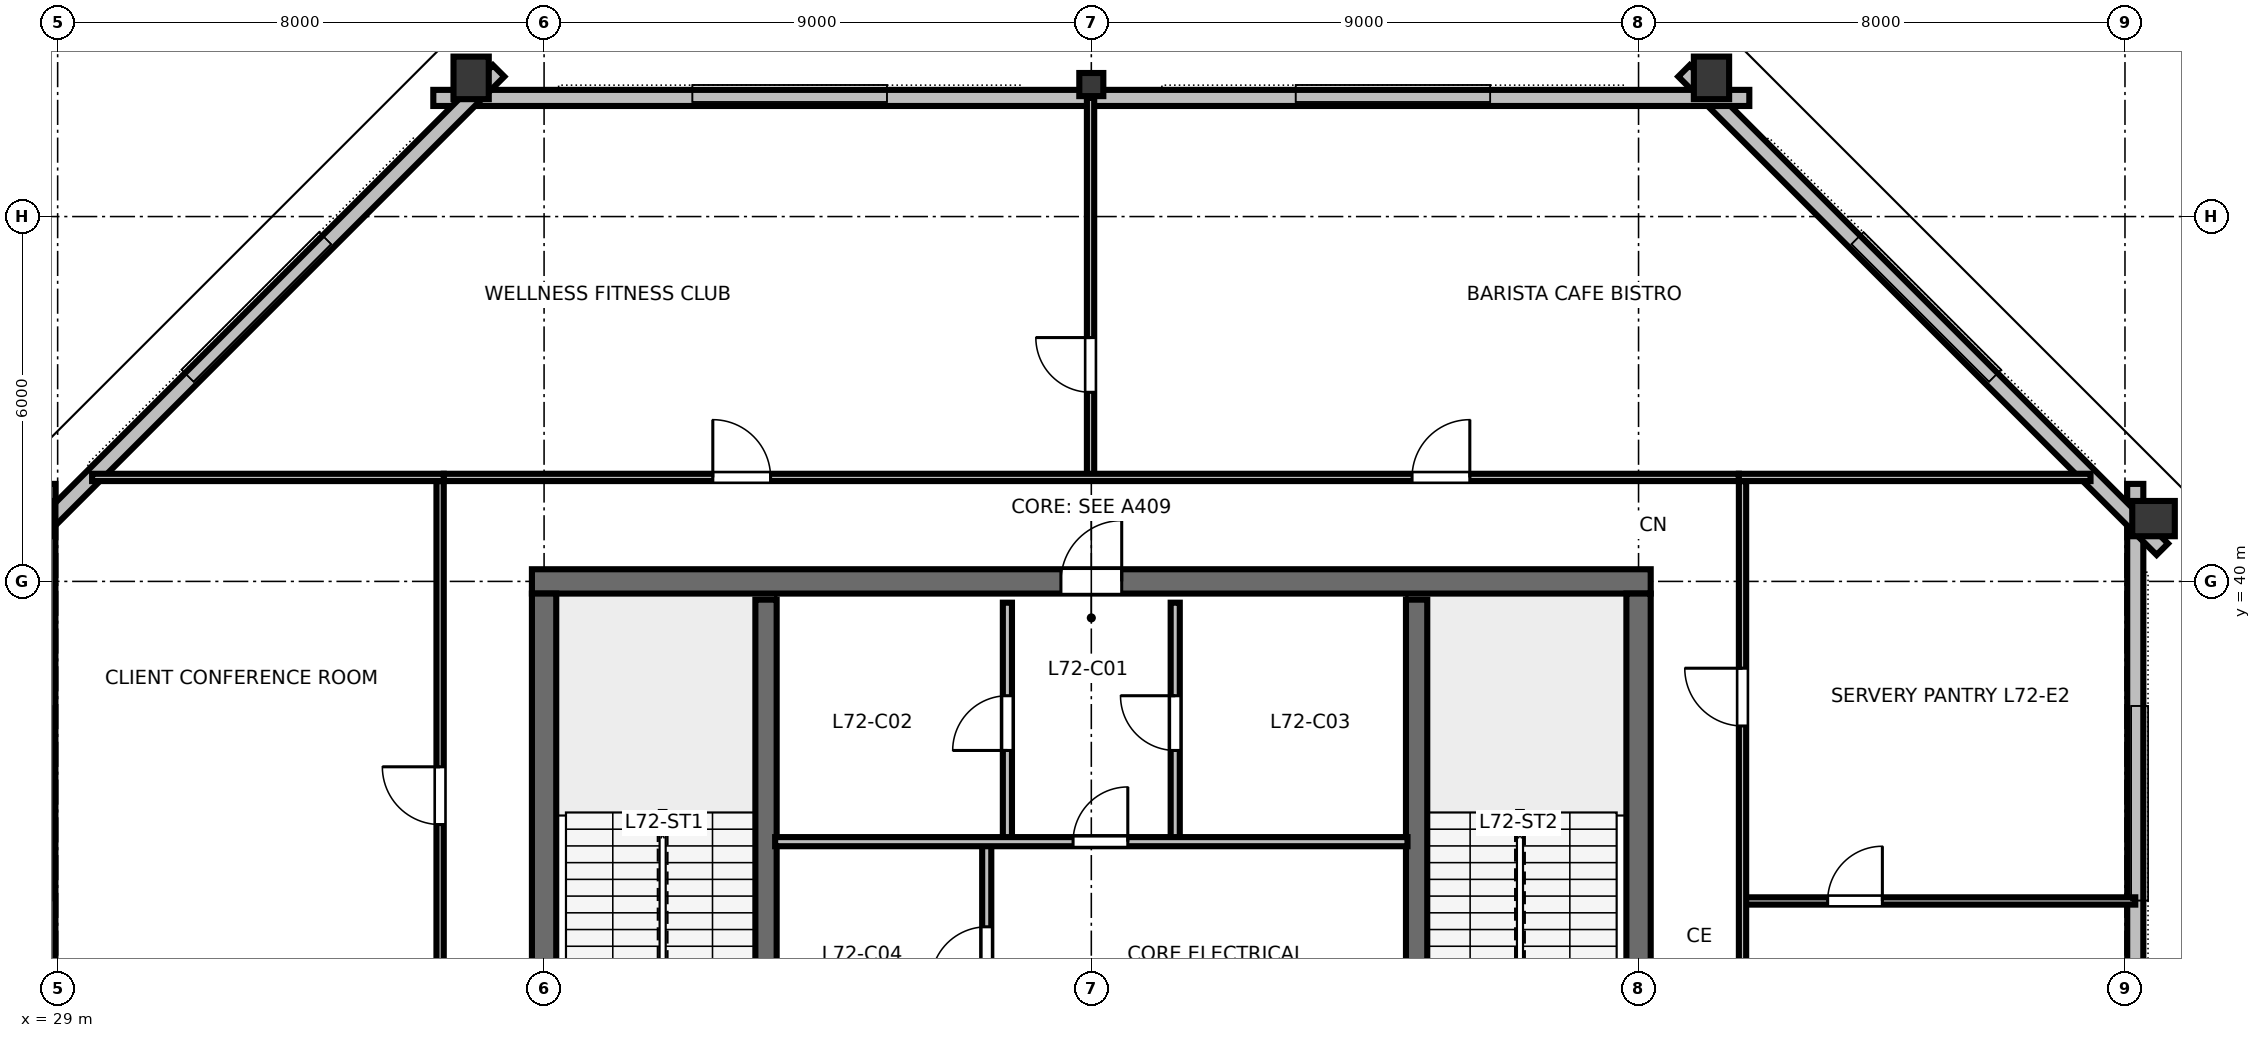
"""IFC4 building model, lengths in metres.
Left out: names, types, materials, properties, quantities, classifications, styles, units other than length and angle.
Written with IfcOpenShell. Run it as: python <this file> out.ifc"""

import sys

from ifc_helpers import new_model, si_unit, direction, frame, frame_2d, origin, origin_2d, place, context, subcontext, project, spatial, rectangle, hollow_rectangle, i_section, extrude, element, fill, save


model = new_model("IFC4")
c1 = context("Model", 3, precision=1e-05, world=origin(), true_north=direction((0.0, 1.0)))
c2 = subcontext(c1, "Body", "Model", "MODEL_VIEW")
j1 = project(units=[si_unit("LENGTHUNIT", "METRE"), si_unit("PLANEANGLEUNIT", "RADIAN")], contexts=[c1])
p1 = place(None, origin())
s1 = spatial("IfcSite", under=j1, at=p1, CompositionType="ELEMENT")
p2 = place(p1, origin())
s2 = spatial("IfcBuilding", under=s1, at=p2, CompositionType="ELEMENT")
p3 = place(p2, frame((0.0, 0.0, 271.8)))
s3 = spatial("IfcBuildingStorey", under=s2, at=p3, CompositionType="ELEMENT", Elevation=271.8)
p4 = place(p3, frame((36.8, 40.0, 0.0), z_axis=(0.0, 0.0, 1.0), x_axis=(1.0, 0.0, 0.0)))
e1 = element("IfcWall", 1, at=p4, inside=s3, PredefinedType="SHEAR", context=c2, shape_type="SweptSolid", body=[
    extrude(rectangle(XDim=18.4, YDim=0.4, at=frame_2d((9.2, 0.0))), origin(), (0.0, 0.0, 1.0), 3.36),
])
p5 = place(p4, frame((8.7, 0.0, 0.0)))
e2 = element("IfcOpeningElement", 2, at=p5, cuts=e1, PredefinedType="OPENING", context=c2, shape_type="SweptSolid", body=[
    extrude(rectangle(XDim=1.0, YDim=2.15, at=frame_2d((0.5, 1.075))), frame((0.0, 0.21, 0.0), z_axis=(0.0, -1.0, 0.0), x_axis=(1.0, 0.0, 0.0)), (0.0, 0.0, 1.0), 0.42),
])
p6 = place(p3, frame((37.0, 24.2, 0.0), z_axis=(0.0, 0.0, 1.0), x_axis=(0.0, 1.0, 0.0)))
e3 = element("IfcWall", 3, at=p6, inside=s3, PredefinedType="SHEAR", context=c2, shape_type="SweptSolid", body=[
    extrude(rectangle(XDim=15.6, YDim=0.4, at=frame_2d((7.8, 0.0))), origin(), (0.0, 0.0, 1.0), 3.36),
])
p7 = place(p6, frame((5.325, 0.0, 0.0)))
e4 = element("IfcOpeningElement", 4, at=p7, cuts=e3, PredefinedType="OPENING", context=c2, shape_type="SweptSolid", body=[
    extrude(rectangle(XDim=1.15, YDim=2.15, at=frame_2d((0.575, 1.075))), frame((0.0, 0.21, 0.0), z_axis=(0.0, -1.0, 0.0), x_axis=(1.0, 0.0, 0.0)), (0.0, 0.0, 1.0), 0.42),
])
p8 = place(p3, frame((55.0, 24.2, 0.0), z_axis=(0.0, 0.0, 1.0), x_axis=(0.0, 1.0, 0.0)))
e5 = element("IfcWall", 5, at=p8, inside=s3, PredefinedType="SHEAR", context=c2, shape_type="SweptSolid", body=[
    extrude(rectangle(XDim=15.6, YDim=0.4, at=frame_2d((7.8, 0.0))), origin(), (0.0, 0.0, 1.0), 3.36),
])
p9 = place(p8, frame((5.325, 0.0, 0.0)))
e6 = element("IfcOpeningElement", 6, at=p9, cuts=e5, PredefinedType="OPENING", context=c2, shape_type="SweptSolid", body=[
    extrude(rectangle(XDim=1.15, YDim=2.15, at=frame_2d((0.575, 1.075))), frame((0.0, 0.21, 0.0), z_axis=(0.0, -1.0, 0.0), x_axis=(1.0, 0.0, 0.0)), (0.0, 0.0, 1.0), 0.42),
])
for number, where, z_axis, x_axis in (
    (7, (63.469, 41.033, 0.0), (0.0, 0.0, 1.0), (0.0, 1.0, 0.0)),
    (8, (56.2, 48.281, 0.0), (0.0, 0.0, 1.0), (1.0, 0.0, 0.0)),
):
    element("IfcColumn", number, at=place(p3, frame(where, z_axis=z_axis, x_axis=x_axis)), inside=s3, PredefinedType="COLUMN", context=c2, shape_type="SweptSolid", body=[
        extrude(hollow_rectangle(XDim=0.58, YDim=0.7, WallThickness=0.032, at=origin_2d()), origin(), (0.0, 0.0, 1.0), 3.373),
    ])
p10 = place(p3, frame((46.0, 48.171, 0.0), z_axis=(0.0, 0.0, 1.0), x_axis=(1.0, 0.0, 0.0)))
e9 = element("IfcColumn", 9, at=p10, inside=s3, PredefinedType="COLUMN", context=c2, shape_type="SweptSolid", body=[
    extrude(i_section(OverallWidth=0.395, OverallDepth=0.38, WebThickness=0.019, FlangeThickness=0.03, FilletRadius=0.025, at=origin_2d()), origin(), (0.0, 0.0, 1.0), 3.373),
])
p11 = place(p3, frame((35.8, 48.281, 0.0), z_axis=(0.0, 0.0, 1.0), x_axis=(1.0, 0.0, 0.0)))
e10 = element("IfcColumn", 10, at=p11, inside=s3, PredefinedType="COLUMN", context=c2, shape_type="SweptSolid", body=[
    extrude(hollow_rectangle(XDim=0.58, YDim=0.7, WallThickness=0.032, at=origin_2d()), origin(), (0.0, 0.0, 1.0), 3.373),
])
p12 = place(p3, frame((63.169, 22.396, 0.0), z_axis=(0.0, 0.0, 1.0), x_axis=(0.0, 1.0, 0.0)))
e11 = element("IfcWall", 11, at=p12, inside=s3, PredefinedType="STANDARD", context=c2, shape_type="SweptSolid", body=[
    extrude(rectangle(XDim=19.207, YDim=0.265, at=frame_2d((9.604, 0.0))), origin(), (0.0, 0.0, 1.0), 2.832),
])
p13 = place(p3, frame((63.614, 40.529, 0.0), z_axis=(0.0, 0.0, 1.0), x_axis=(-0.707106781187, 0.707106781187, 0.0)))
e12 = element("IfcWall", 12, at=p13, inside=s3, PredefinedType="STANDARD", context=c2, shape_type="SweptSolid", body=[
    extrude(rectangle(XDim=11.125, YDim=0.265, at=frame_2d((5.562, 0.0))), origin(), (0.0, 0.0, 1.0), 2.832),
])
p14 = place(p3, frame((56.822, 47.951, 0.0), z_axis=(0.0, 0.0, 1.0), x_axis=(-1.0, 0.0, 0.0)))
e13 = element("IfcWall", 13, at=p14, inside=s3, PredefinedType="STANDARD", context=c2, shape_type="SweptSolid", body=[
    extrude(rectangle(XDim=21.644, YDim=0.265, at=frame_2d((10.822, 0.0))), origin(), (0.0, 0.0, 1.0), 2.832),
])
p15 = place(p3, frame((36.253, 48.396, 0.0), z_axis=(0.0, 0.0, 1.0), x_axis=(-0.707106781187, -0.707106781187, 0.0)))
e14 = element("IfcWall", 14, at=p15, inside=s3, PredefinedType="STANDARD", context=c2, shape_type="SweptSolid", body=[
    extrude(rectangle(XDim=11.125, YDim=0.265, at=frame_2d((5.562, 0.0))), origin(), (0.0, 0.0, 1.0), 2.832),
])
p16 = place(p3, frame((28.831, 41.604, 0.0), z_axis=(0.0, 0.0, 1.0), x_axis=(0.0, -1.0, 0.0)))
e15 = element("IfcWall", 15, at=p16, inside=s3, PredefinedType="STANDARD", context=c2, shape_type="SweptSolid", body=[
    extrude(rectangle(XDim=19.207, YDim=0.265, at=frame_2d((9.604, 0.0))), origin(), (0.0, 0.0, 1.0), 2.832),
])
for number, where, z_axis, x_axis in (
    (16, (40.65, 32.0, 0.0), (0.0, 0.0, 1.0), (0.0, 1.0, 0.0)),
    (17, (51.35, 32.0, 0.0), (0.0, 0.0, 1.0), (0.0, 1.0, 0.0)),
):
    element("IfcWall", number, at=place(p3, frame(where, z_axis=z_axis, x_axis=x_axis)), inside=s3, PredefinedType="SHEAR", context=c2, shape_type="SweptSolid", body=[
        extrude(rectangle(XDim=7.7, YDim=0.35, at=frame_2d((3.85, 0.0))), origin(), (0.0, 0.0, 1.0), 3.6),
    ])
p17 = place(p3, frame((44.62, 35.72, 0.0), z_axis=(0.0, 0.0, 1.0), x_axis=(0.0, 1.0, 0.0)))
e18 = element("IfcWall", 18, at=p17, inside=s3, PredefinedType="PARTITIONING", context=c2, shape_type="SweptSolid", body=[
    extrude(rectangle(XDim=3.93, YDim=0.15, at=frame_2d((1.965, 0.0))), origin(), (0.0, 0.0, 1.0), 3.375),
])
p18 = place(p17, frame((1.5, 0.0, 0.0)))
e19 = element("IfcOpeningElement", 19, at=p18, cuts=e18, PredefinedType="OPENING", context=c2, shape_type="SweptSolid", body=[
    extrude(rectangle(XDim=0.9, YDim=2.15, at=frame_2d((0.45, 1.075))), frame((0.0, 0.085, 0.0), z_axis=(0.0, -1.0, 0.0), x_axis=(1.0, 0.0, 0.0)), (0.0, 0.0, 1.0), 0.17),
])
p19 = place(p3, frame((47.38, 35.72, 0.0), z_axis=(0.0, 0.0, 1.0), x_axis=(0.0, 1.0, 0.0)))
e20 = element("IfcWall", 20, at=p19, inside=s3, PredefinedType="PARTITIONING", context=c2, shape_type="SweptSolid", body=[
    extrude(rectangle(XDim=3.93, YDim=0.15, at=frame_2d((1.965, 0.0))), origin(), (0.0, 0.0, 1.0), 3.375),
])
p20 = place(p19, frame((1.5, 0.0, 0.0)))
e21 = element("IfcOpeningElement", 21, at=p20, cuts=e20, PredefinedType="OPENING", context=c2, shape_type="SweptSolid", body=[
    extrude(rectangle(XDim=0.9, YDim=2.15, at=frame_2d((0.45, 1.075))), frame((0.0, 0.085, 0.0), z_axis=(0.0, -1.0, 0.0), x_axis=(1.0, 0.0, 0.0)), (0.0, 0.0, 1.0), 0.17),
])
p21 = place(p3, frame((44.28, 32.05, 0.0), z_axis=(0.0, 0.0, 1.0), x_axis=(0.0, 1.0, 0.0)))
e22 = element("IfcWall", 22, at=p21, inside=s3, PredefinedType="PARTITIONING", context=c2, shape_type="SweptSolid", body=[
    extrude(rectangle(XDim=3.67, YDim=0.15, at=frame_2d((1.835, 0.0))), origin(), (0.0, 0.0, 1.0), 3.375),
])
p22 = place(p21, frame((1.35, 0.0, 0.0)))
e23 = element("IfcOpeningElement", 23, at=p22, cuts=e22, PredefinedType="OPENING", context=c2, shape_type="SweptSolid", body=[
    extrude(rectangle(XDim=0.92, YDim=2.15, at=frame_2d((0.46, 1.075))), frame((0.0, 0.085, 0.0), z_axis=(0.0, -1.0, 0.0), x_axis=(1.0, 0.0, 0.0)), (0.0, 0.0, 1.0), 0.17),
])
p23 = place(p3, frame((40.8, 35.72, 0.0), z_axis=(0.0, 0.0, 1.0), x_axis=(1.0, 0.0, 0.0)))
e24 = element("IfcWall", 24, at=p23, inside=s3, PredefinedType="PARTITIONING", context=c2, shape_type="SweptSolid", body=[
    extrude(rectangle(XDim=10.4, YDim=0.15, at=frame_2d((5.2, 0.0))), origin(), (0.0, 0.0, 1.0), 3.375),
])
p24 = place(p23, frame((4.9, 0.0, 0.0)))
e25 = element("IfcOpeningElement", 25, at=p24, cuts=e24, PredefinedType="OPENING", context=c2, shape_type="SweptSolid", body=[
    extrude(rectangle(XDim=0.9, YDim=2.15, at=frame_2d((0.45, 1.075))), frame((0.0, 0.085, 0.0), z_axis=(0.0, -1.0, 0.0), x_axis=(1.0, 0.0, 0.0)), (0.0, 0.0, 1.0), 0.17),
])
p25 = place(p3, frame((45.987, 41.71, 0.0), z_axis=(0.0, 0.0, 1.0), x_axis=(0.0, 1.0, 0.0)))
e26 = element("IfcWall", 26, at=p25, inside=s3, PredefinedType="PARTITIONING", context=c2, shape_type="SweptSolid", body=[
    extrude(rectangle(XDim=6.241, YDim=0.12, at=frame_2d((3.121, 0.0))), origin(), (0.0, 0.0, 1.0), 2.655),
])
p26 = place(p25, frame((1.4, 0.0, 0.0)))
e27 = element("IfcOpeningElement", 27, at=p26, cuts=e26, PredefinedType="OPENING", context=c2, shape_type="SweptSolid", body=[
    extrude(rectangle(XDim=0.9, YDim=2.15, at=frame_2d((0.45, 1.075))), frame((0.0, 0.07, 0.0), z_axis=(0.0, -1.0, 0.0), x_axis=(1.0, 0.0, 0.0)), (0.0, 0.0, 1.0), 0.14),
])
p27 = place(p3, frame((35.35, 41.71, 0.0), z_axis=(0.0, 0.0, 1.0), x_axis=(1.0, 0.0, 0.0)))
e28 = element("IfcWall", 28, at=p27, inside=s3, PredefinedType="PARTITIONING", context=c2, shape_type="SweptSolid", body=[
    extrude(rectangle(XDim=21.3, YDim=0.12, at=frame_2d((10.65, 0.0))), origin(), (0.0, 0.0, 1.0), 2.655),
])
p28 = place(p27, frame((4.425, 0.0, 0.0)))
e29 = element("IfcOpeningElement", 29, at=p28, cuts=e28, PredefinedType="OPENING", context=c2, shape_type="SweptSolid", body=[
    extrude(rectangle(XDim=0.95, YDim=2.15, at=frame_2d((0.475, 1.075))), frame((0.0, 0.07, 0.0), z_axis=(0.0, -1.0, 0.0), x_axis=(1.0, 0.0, 0.0)), (0.0, 0.0, 1.0), 0.14),
])
p29 = place(p27, frame((15.925, 0.0, 0.0)))
e30 = element("IfcOpeningElement", 30, at=p29, cuts=e28, PredefinedType="OPENING", context=c2, shape_type="SweptSolid", body=[
    extrude(rectangle(XDim=0.95, YDim=2.15, at=frame_2d((0.475, 1.075))), frame((0.0, 0.07, 0.0), z_axis=(0.0, -1.0, 0.0), x_axis=(1.0, 0.0, 0.0)), (0.0, 0.0, 1.0), 0.14),
])
p30 = place(p3, frame((35.29, 22.35, 0.0), z_axis=(0.0, 0.0, 1.0), x_axis=(0.0, 1.0, 0.0)))
e31 = element("IfcWall", 31, at=p30, inside=s3, PredefinedType="PARTITIONING", context=c2, shape_type="SweptSolid", body=[
    extrude(rectangle(XDim=19.3, YDim=0.12, at=frame_2d((9.65, 0.0))), origin(), (0.0, 0.0, 1.0), 2.655),
])
p31 = place(p30, frame((4.201, 0.0, 0.0)))
e32 = element("IfcOpeningElement", 32, at=p31, cuts=e31, PredefinedType="OPENING", context=c2, shape_type="SweptSolid", body=[
    extrude(rectangle(XDim=0.95, YDim=2.15, at=frame_2d((0.475, 1.075))), frame((0.0, 0.07, 0.0), z_axis=(0.0, -1.0, 0.0), x_axis=(1.0, 0.0, 0.0)), (0.0, 0.0, 1.0), 0.14),
])
p32 = place(p30, frame((13.651, 0.0, 0.0)))
e33 = element("IfcOpeningElement", 33, at=p32, cuts=e31, PredefinedType="OPENING", context=c2, shape_type="SweptSolid", body=[
    extrude(rectangle(XDim=0.95, YDim=2.15, at=frame_2d((0.475, 1.075))), frame((0.0, 0.07, 0.0), z_axis=(0.0, -1.0, 0.0), x_axis=(1.0, 0.0, 0.0)), (0.0, 0.0, 1.0), 0.14),
])
p33 = place(p3, frame((56.71, 34.745, 0.0), z_axis=(0.0, 0.0, 1.0), x_axis=(1.0, 0.0, 0.0)))
e34 = element("IfcWall", 34, at=p33, inside=s3, PredefinedType="PARTITIONING", context=c2, shape_type="SweptSolid", body=[
    extrude(rectangle(XDim=6.459, YDim=0.12, at=frame_2d((3.229, 0.0))), origin(), (0.0, 0.0, 1.0), 2.655),
])
p34 = place(p33, frame((1.4, 0.0, 0.0)))
e35 = element("IfcOpeningElement", 35, at=p34, cuts=e34, PredefinedType="OPENING", context=c2, shape_type="SweptSolid", body=[
    extrude(rectangle(XDim=0.9, YDim=2.15, at=frame_2d((0.45, 1.075))), frame((0.0, 0.07, 0.0), z_axis=(0.0, -1.0, 0.0), x_axis=(1.0, 0.0, 0.0)), (0.0, 0.0, 1.0), 0.14),
])
p35 = place(p3, frame((56.71, 22.35, 0.0), z_axis=(0.0, 0.0, 1.0), x_axis=(0.0, 1.0, 0.0)))
e36 = element("IfcWall", 36, at=p35, inside=s3, PredefinedType="PARTITIONING", context=c2, shape_type="SweptSolid", body=[
    extrude(rectangle(XDim=19.3, YDim=0.12, at=frame_2d((9.65, 0.0))), origin(), (0.0, 0.0, 1.0), 2.655),
])
p36 = place(p35, frame((5.823, 0.0, 0.0)))
e37 = element("IfcOpeningElement", 37, at=p36, cuts=e36, PredefinedType="OPENING", context=c2, shape_type="SweptSolid", body=[
    extrude(rectangle(XDim=0.95, YDim=2.15, at=frame_2d((0.475, 1.075))), frame((0.0, 0.07, 0.0), z_axis=(0.0, -1.0, 0.0), x_axis=(1.0, 0.0, 0.0)), (0.0, 0.0, 1.0), 0.14),
])
p37 = place(p35, frame((15.272, 0.0, 0.0)))
e38 = element("IfcOpeningElement", 38, at=p37, cuts=e36, PredefinedType="OPENING", context=c2, shape_type="SweptSolid", body=[
    extrude(rectangle(XDim=0.95, YDim=2.15, at=frame_2d((0.475, 1.075))), frame((0.0, 0.07, 0.0), z_axis=(0.0, -1.0, 0.0), x_axis=(1.0, 0.0, 0.0)), (0.0, 0.0, 1.0), 0.14),
])
for number, where, z_axis, x_axis in (
    (39, (35.35, 41.71, 0.0), (0.0, 0.0, 1.0), (-1.0, 0.0, 0.0)),
    (40, (56.65, 41.71, 0.0), (0.0, 0.0, 1.0), (1.0, 0.0, 0.0)),
):
    element("IfcWall", number, at=place(p3, frame(where, z_axis=z_axis, x_axis=x_axis)), inside=s3, PredefinedType="PARTITIONING", context=c2, shape_type="SweptSolid", body=[
        extrude(rectangle(XDim=5.783, YDim=0.12, at=frame_2d((2.892, 0.0))), origin(), (0.0, 0.0, 1.0), 2.655),
    ])
p38 = place(p5, origin())
e41 = element("IfcDoor", 41, at=p38, inside=s3, OperationType="SINGLE_SWING_RIGHT", PredefinedType="DOOR", context=c2, shape_type="SweptSolid", body=[
    extrude(rectangle(XDim=1.0, YDim=2.15, at=frame_2d((0.5, 1.075))), frame((0.0, 0.025, 0.0), z_axis=(0.0, -1.0, 0.0), x_axis=(1.0, 0.0, 0.0)), (0.0, 0.0, 1.0), 0.05),
])
fill(e2, e41)
p39 = place(p18, origin())
e42 = element("IfcDoor", 42, at=p39, inside=s3, OperationType="SINGLE_SWING_LEFT", PredefinedType="DOOR", context=c2, shape_type="SweptSolid", body=[
    extrude(rectangle(XDim=0.9, YDim=2.15, at=frame_2d((0.45, 1.075))), frame((0.0, 0.025, 0.0), z_axis=(0.0, -1.0, 0.0), x_axis=(1.0, 0.0, 0.0)), (0.0, 0.0, 1.0), 0.05),
])
fill(e19, e42)
p40 = place(p20, origin())
e43 = element("IfcDoor", 43, at=p40, inside=s3, OperationType="SINGLE_SWING_RIGHT", PredefinedType="DOOR", context=c2, shape_type="SweptSolid", body=[
    extrude(rectangle(XDim=0.9, YDim=2.15, at=frame_2d((0.45, 1.075))), frame((0.0, 0.025, 0.0), z_axis=(0.0, -1.0, 0.0), x_axis=(1.0, 0.0, 0.0)), (0.0, 0.0, 1.0), 0.05),
])
fill(e21, e43)
p41 = place(p22, origin())
e44 = element("IfcDoor", 44, at=p41, inside=s3, OperationType="SINGLE_SWING_LEFT", PredefinedType="DOOR", context=c2, shape_type="SweptSolid", body=[
    extrude(rectangle(XDim=0.92, YDim=2.15, at=frame_2d((0.46, 1.075))), frame((0.0, 0.025, 0.0), z_axis=(0.0, -1.0, 0.0), x_axis=(1.0, 0.0, 0.0)), (0.0, 0.0, 1.0), 0.05),
])
fill(e23, e44)
p42 = place(p24, origin())
e45 = element("IfcDoor", 45, at=p42, inside=s3, OperationType="SINGLE_SWING_RIGHT", PredefinedType="DOOR", context=c2, shape_type="SweptSolid", body=[
    extrude(rectangle(XDim=0.9, YDim=2.15, at=frame_2d((0.45, 1.075))), frame((0.0, 0.025, 0.0), z_axis=(0.0, -1.0, 0.0), x_axis=(1.0, 0.0, 0.0)), (0.0, 0.0, 1.0), 0.05),
])
fill(e25, e45)
p43 = place(p26, origin())
e46 = element("IfcDoor", 46, at=p43, inside=s3, OperationType="SINGLE_SWING_RIGHT", PredefinedType="DOOR", context=c2, shape_type="SweptSolid", body=[
    extrude(rectangle(XDim=0.9, YDim=2.15, at=frame_2d((0.45, 1.075))), frame((0.0, 0.025, 0.0), z_axis=(0.0, -1.0, 0.0), x_axis=(1.0, 0.0, 0.0)), (0.0, 0.0, 1.0), 0.05),
])
fill(e27, e46)
p44 = place(p28, origin())
e47 = element("IfcDoor", 47, at=p44, inside=s3, OperationType="SINGLE_SWING_LEFT", PredefinedType="DOOR", context=c2, shape_type="SweptSolid", body=[
    extrude(rectangle(XDim=0.95, YDim=2.15, at=frame_2d((0.475, 1.075))), frame((0.0, 0.025, 0.0), z_axis=(0.0, -1.0, 0.0), x_axis=(1.0, 0.0, 0.0)), (0.0, 0.0, 1.0), 0.05),
])
fill(e29, e47)
p45 = place(p29, origin())
e48 = element("IfcDoor", 48, at=p45, inside=s3, OperationType="SINGLE_SWING_RIGHT", PredefinedType="DOOR", context=c2, shape_type="SweptSolid", body=[
    extrude(rectangle(XDim=0.95, YDim=2.15, at=frame_2d((0.475, 1.075))), frame((0.0, 0.025, 0.0), z_axis=(0.0, -1.0, 0.0), x_axis=(1.0, 0.0, 0.0)), (0.0, 0.0, 1.0), 0.05),
])
fill(e30, e48)
p46 = place(p32, origin())
e49 = element("IfcDoor", 49, at=p46, inside=s3, OperationType="SINGLE_SWING_RIGHT", PredefinedType="DOOR", context=c2, shape_type="SweptSolid", body=[
    extrude(rectangle(XDim=0.95, YDim=2.15, at=frame_2d((0.475, 1.075))), frame((0.0, 0.025, 0.0), z_axis=(0.0, -1.0, 0.0), x_axis=(1.0, 0.0, 0.0)), (0.0, 0.0, 1.0), 0.05),
])
fill(e33, e49)
p47 = place(p34, origin())
e50 = element("IfcDoor", 50, at=p47, inside=s3, OperationType="SINGLE_SWING_RIGHT", PredefinedType="DOOR", context=c2, shape_type="SweptSolid", body=[
    extrude(rectangle(XDim=0.9, YDim=2.15, at=frame_2d((0.45, 1.075))), frame((0.0, 0.025, 0.0), z_axis=(0.0, -1.0, 0.0), x_axis=(1.0, 0.0, 0.0)), (0.0, 0.0, 1.0), 0.05),
])
fill(e35, e50)
p48 = place(p37, origin())
e51 = element("IfcDoor", 51, at=p48, inside=s3, OperationType="SINGLE_SWING_RIGHT", PredefinedType="DOOR", context=c2, shape_type="SweptSolid", body=[
    extrude(rectangle(XDim=0.95, YDim=2.15, at=frame_2d((0.475, 1.075))), frame((0.0, 0.025, 0.0), z_axis=(0.0, -1.0, 0.0), x_axis=(1.0, 0.0, 0.0)), (0.0, 0.0, 1.0), 0.05),
])
fill(e38, e51)
save(model, sys.argv[1])
